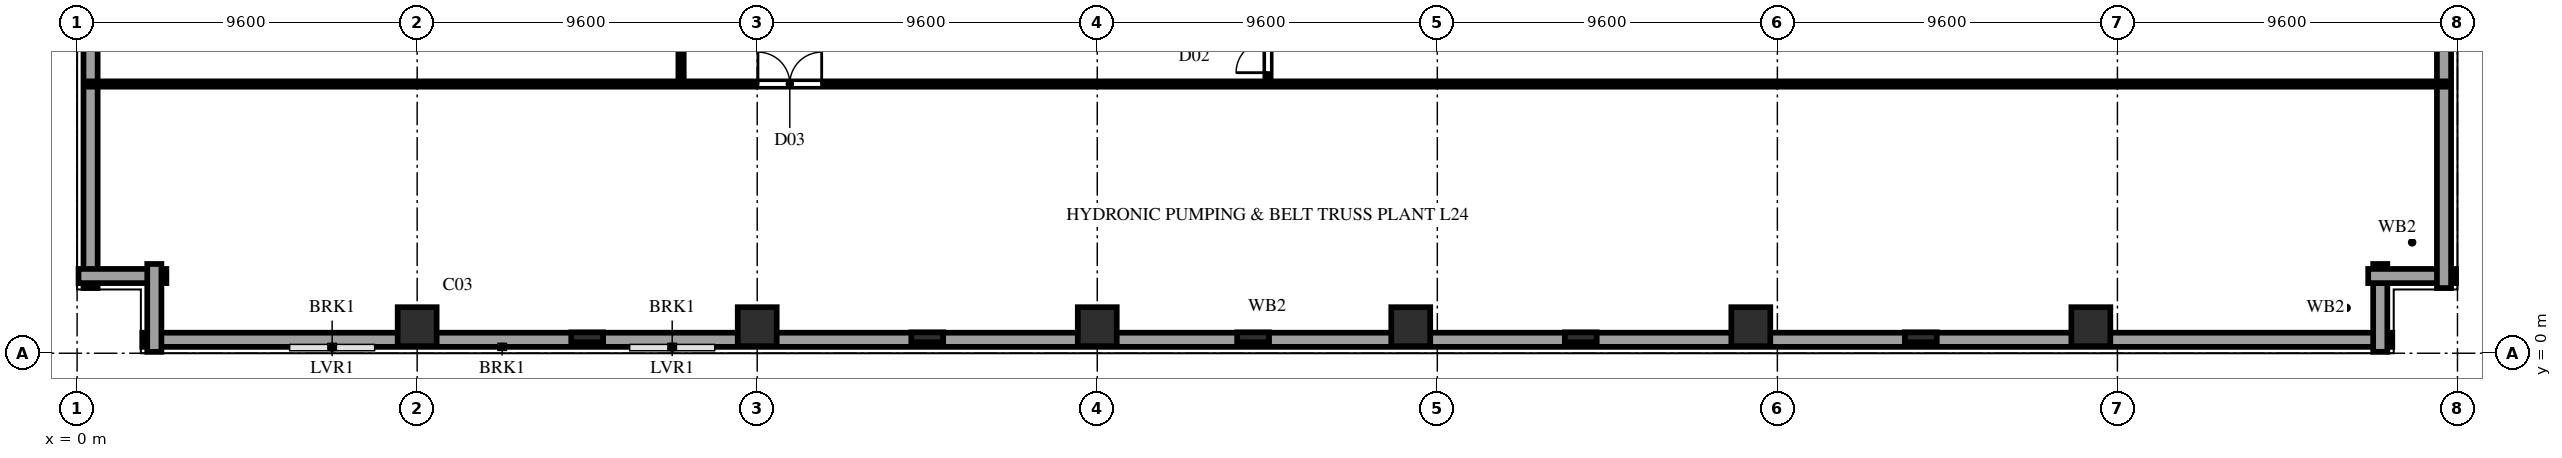
"""IFC4 building model, lengths in metres.
Left out: names, types, materials, properties, quantities, classifications, styles, units other than length and angle.
Written with IfcOpenShell. Run it as: python <this file> out.ifc"""

import sys

from ifc_helpers import new_model, si_unit, direction, frame, frame_2d, origin, origin_2d, place, context, subcontext, project, spatial, rectangle, extrude, element, fill, save


model = new_model("IFC4")
c1 = context("Model", 3, precision=1e-05, world=origin(), true_north=direction((0.0, 1.0)))
c2 = subcontext(c1, "Body", "Model", "MODEL_VIEW")
j1 = project(units=[si_unit("LENGTHUNIT", "METRE"), si_unit("PLANEANGLEUNIT", "RADIAN")], contexts=[c1])
p1 = place(None, origin())
s1 = spatial("IfcSite", under=j1, at=p1, CompositionType="ELEMENT")
p2 = place(p1, origin())
s2 = spatial("IfcBuilding", under=s1, at=p2, CompositionType="ELEMENT")
p3 = place(p2, frame((0.0, 0.0, 96.4)))
s3 = spatial("IfcBuildingStorey", under=s2, at=p3, CompositionType="ELEMENT", Elevation=96.4)
for number, where, z_axis, x_axis in (
    (1, (9.6, 0.75, 0.0), (0.0, 0.0, 1.0), (1.0, 0.0, 0.0)),
    (2, (19.2, 0.75, 0.0), (0.0, 0.0, 1.0), (1.0, 0.0, 0.0)),
    (3, (28.8, 0.75, 0.0), (0.0, 0.0, 1.0), (1.0, 0.0, 0.0)),
    (4, (37.65, 0.75, 0.0), (0.0, 0.0, 1.0), (1.0, 0.0, 0.0)),
    (5, (47.25, 0.75, 0.0), (0.0, 0.0, 1.0), (1.0, 0.0, 0.0)),
    (6, (56.85, 0.75, 0.0), (0.0, 0.0, 1.0), (1.0, 0.0, 0.0)),
):
    element("IfcColumn", number, at=place(p3, frame(where, z_axis=z_axis, x_axis=x_axis)), inside=s3, PredefinedType="COLUMN", context=c2, shape_type="SweptSolid", body=[
        extrude(rectangle(XDim=1.1, YDim=1.1, at=origin_2d()), origin(), (0.0, 0.0, 1.0), 5.0),
    ])
for number, where, z_axis, x_axis in (
    (7, (14.4, 0.45, 0.0), (0.0, 0.0, 1.0), (1.0, 0.0, 0.0)),
    (8, (24.0, 0.45, 0.0), (0.0, 0.0, 1.0), (1.0, 0.0, 0.0)),
    (9, (33.2, 0.45, 0.0), (0.0, 0.0, 1.0), (1.0, 0.0, 0.0)),
    (10, (42.45, 0.45, 0.0), (0.0, 0.0, 1.0), (1.0, 0.0, 0.0)),
    (11, (52.05, 0.45, 0.0), (0.0, 0.0, 1.0), (1.0, 0.0, 0.0)),
):
    element("IfcColumn", number, at=place(p3, frame(where, z_axis=z_axis, x_axis=x_axis)), inside=s3, PredefinedType="PILASTER", context=c2, shape_type="SweptSolid", body=[
        extrude(rectangle(XDim=0.9, YDim=0.28, at=origin_2d()), origin(), (0.0, 0.0, 1.0), 5.0),
    ])
p4 = place(p3, frame((1.84, 0.38, 0.0), z_axis=(0.0, 0.0, 1.0), x_axis=(1.0, 0.0, 0.0)))
e12 = element("IfcWall", 12, at=p4, inside=s3, PredefinedType="SOLIDWALL", context=c2, shape_type="SweptSolid", body=[
    extrude(rectangle(XDim=63.52, YDim=0.4, at=frame_2d((31.76, 0.0))), origin(), (0.0, 0.0, 1.0), 4.74),
])
for number, where, z_axis, x_axis in (
    (13, (65.02, 0.04, 0.0), (0.0, 0.0, 1.0), (0.0, 1.0, 0.0)),
    (14, (64.68, 2.18, 0.0), (0.0, 0.0, 1.0), (1.0, 0.0, 0.0)),
):
    element("IfcWall", number, at=place(p3, frame(where, z_axis=z_axis, x_axis=x_axis)), inside=s3, PredefinedType="SOLIDWALL", context=c2, shape_type="SweptSolid", body=[
        extrude(rectangle(XDim=2.48, YDim=0.4, at=frame_2d((1.24, 0.0))), origin(), (0.0, 0.0, 1.0), 4.7),
    ])
p5 = place(p3, frame((66.82, 1.84, 0.0), z_axis=(0.0, 0.0, 1.0), x_axis=(0.0, 1.0, 0.0)))
e15 = element("IfcWall", 15, at=p5, inside=s3, PredefinedType="SOLIDWALL", context=c2, shape_type="SweptSolid", body=[
    extrude(rectangle(XDim=34.72, YDim=0.4, at=frame_2d((17.36, 0.0))), origin(), (0.0, 0.0, 1.0), 4.7),
])
p6 = place(p3, frame((0.38, 65.36, 0.0), z_axis=(0.0, 0.0, 1.0), x_axis=(0.0, -1.0, 0.0)))
e16 = element("IfcWall", 16, at=p6, inside=s3, PredefinedType="SOLIDWALL", context=c2, shape_type="SweptSolid", body=[
    extrude(rectangle(XDim=63.52, YDim=0.4, at=frame_2d((31.76, 0.0))), origin(), (0.0, 0.0, 1.0), 4.74),
])
for number, where, z_axis, x_axis in (
    (17, (0.04, 2.18, 0.0), (0.0, 0.0, 1.0), (1.0, 0.0, 0.0)),
    (18, (2.18, 2.52, 0.0), (0.0, 0.0, 1.0), (0.0, -1.0, 0.0)),
):
    element("IfcWall", number, at=place(p3, frame(where, z_axis=z_axis, x_axis=x_axis)), inside=s3, PredefinedType="SOLIDWALL", context=c2, shape_type="SweptSolid", body=[
        extrude(rectangle(XDim=2.48, YDim=0.4, at=frame_2d((1.24, 0.0))), origin(), (0.0, 0.0, 1.0), 4.74),
    ])
p7 = place(p3, frame((17.05, 7.6, 0.0), z_axis=(0.0, 0.0, 1.0), x_axis=(0.0, 1.0, 0.0)))
e19 = element("IfcWall", 19, at=p7, inside=s3, PredefinedType="PARTITIONING", context=c2, shape_type="SweptSolid", body=[
    extrude(rectangle(XDim=2.0, YDim=0.15, at=frame_2d((1.0, 0.0))), origin(), (0.0, 0.0, 1.0), 4.74),
])
p8 = place(p3, frame((0.22, 7.6, 0.0), z_axis=(0.0, 0.0, 1.0), x_axis=(1.0, 0.0, 0.0)))
e20 = element("IfcWall", 20, at=p8, inside=s3, PredefinedType="PARTITIONING", context=c2, shape_type="SweptSolid", body=[
    extrude(rectangle(XDim=66.76, YDim=0.15, at=frame_2d((33.38, 0.0))), origin(), (0.0, 0.0, 1.0), 4.74),
])
p9 = place(p8, frame((19.0, 0.0, 0.0)))
e21 = element("IfcOpeningElement", 21, at=p9, cuts=e20, PredefinedType="OPENING", context=c2, shape_type="SweptSolid", body=[
    extrude(rectangle(XDim=1.8, YDim=2.2, at=frame_2d((0.9, 1.1))), frame((0.0, 0.087, 0.0), z_axis=(0.0, -1.0, 0.0), x_axis=(1.0, 0.0, 0.0)), (0.0, 0.0, 1.0), 0.174),
])
p10 = place(p3, frame((33.62, 7.6, 0.0), z_axis=(0.0, 0.0, 1.0), x_axis=(0.0, 1.0, 0.0)))
e22 = element("IfcWall", 22, at=p10, inside=s3, PredefinedType="PARTITIONING", context=c2, shape_type="SweptSolid", body=[
    extrude(rectangle(XDim=2.45, YDim=0.15, at=frame_2d((1.225, 0.0))), origin(), (0.0, 0.0, 1.0), 4.74),
])
p11 = place(p10, frame((0.32, 0.0, 0.0)))
e23 = element("IfcOpeningElement", 23, at=p11, cuts=e22, PredefinedType="OPENING", context=c2, shape_type="SweptSolid", body=[
    extrude(rectangle(XDim=1.8, YDim=2.2, at=frame_2d((0.9, 1.1))), frame((0.0, 0.087, 0.0), z_axis=(0.0, -1.0, 0.0), x_axis=(1.0, 0.0, 0.0)), (0.0, 0.0, 1.0), 0.174),
])
p12 = place(p9, origin())
e24 = element("IfcDoor", 24, at=p12, inside=s3, OperationType="DOUBLE_DOOR_SINGLE_SWING", PredefinedType="DOOR", context=c2, shape_type="SweptSolid", body=[
    extrude(rectangle(XDim=1.8, YDim=2.2, at=frame_2d((0.9, 1.1))), frame((0.0, 0.025, 0.0), z_axis=(0.0, -1.0, 0.0), x_axis=(1.0, 0.0, 0.0)), (0.0, 0.0, 1.0), 0.05),
])
fill(e21, e24)
p13 = place(p11, origin())
e25 = element("IfcDoor", 25, at=p13, inside=s3, OperationType="DOUBLE_DOOR_SINGLE_SWING", PredefinedType="DOOR", context=c2, shape_type="SweptSolid", body=[
    extrude(rectangle(XDim=1.8, YDim=2.2, at=frame_2d((0.9, 1.1))), frame((0.0, 0.025, 0.0), z_axis=(0.0, -1.0, 0.0), x_axis=(1.0, 0.0, 0.0)), (0.0, 0.0, 1.0), 0.05),
])
fill(e23, e25)
save(model, sys.argv[1])
